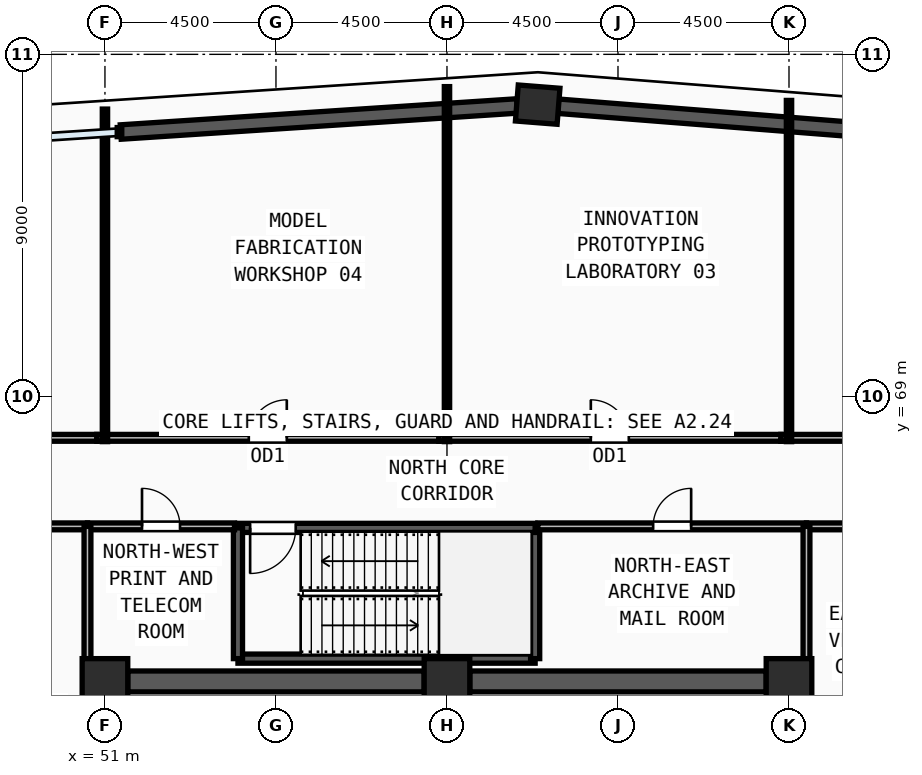
"""IFC4 building model, lengths in metres.
Left out: names, types, materials, properties, quantities, classifications, styles, units other than length and angle.
Written with IfcOpenShell. Run it as: python <this file> out.ifc"""

import sys

from ifc_helpers import new_model, si_unit, direction, frame, frame_2d, origin, origin_2d, place, context, subcontext, project, spatial, rectangle, extrude, source, transform, mapped, element, fill, save


model = new_model("IFC4")
c1 = context("Model", 3, precision=1e-05, world=origin(), true_north=direction((0.0, 1.0)))
c2 = subcontext(c1, "Body", "Model", "MODEL_VIEW")
j1 = project(units=[si_unit("LENGTHUNIT", "METRE"), si_unit("PLANEANGLEUNIT", "RADIAN")], contexts=[c1])
p1 = place(None, origin())
s1 = spatial("IfcSite", under=j1, at=p1, CompositionType="ELEMENT")
p2 = place(p1, origin())
s2 = spatial("IfcBuilding", under=s1, at=p2, CompositionType="ELEMENT")
p3 = place(p2, frame((0.0, 0.0, 282.0)))
s3 = spatial("IfcBuildingStorey", under=s2, at=p3, CompositionType="ELEMENT", Elevation=282.0)
m1 = source(origin(), c2, "Body", "SweptSolid", [
    extrude(rectangle(XDim=1.2, YDim=1.2, at=origin_2d()), origin(), (0.0, 0.0, 1.0), 4.5),
])
for number, where, z_axis, x_axis in (
    (1, (69.0, 61.5, 0.0), (0.0, 0.0, 1.0), (1.0, 0.0, 0.0)),
    (2, (60.0, 61.5, 0.0), (0.0, 0.0, 1.0), (1.0, 0.0, 0.0)),
    (3, (51.0, 61.5, 0.0), (0.0, 0.0, 1.0), (1.0, 0.0, 0.0)),
):
    element("IfcColumn", number, at=place(p3, frame(where, z_axis=z_axis, x_axis=x_axis)), inside=s3, PredefinedType="COLUMN", context=c2, shape_type="MappedRepresentation", body=[
        mapped(m1, transform((0.0, 0.0, 0.0), x_axis=(1.0, 0.0, 0.0), y_axis=(0.0, 1.0, 0.0), z_axis=(0.0, 0.0, 1.0), scale=1.0)),
    ])
m2 = source(origin(), c2, "Body", "SweptSolid", [
    extrude(rectangle(XDim=1.1, YDim=0.95, at=origin_2d()), origin(), (0.0, 0.0, 1.0), 4.5),
])
p4 = place(p3, frame((62.387, 76.677, 0.0), z_axis=(0.0, 0.0, 1.0), x_axis=(-0.996917333733, 0.078459095728, 0.0)))
e4 = element("IfcColumn", 4, at=p4, inside=s3, PredefinedType="COLUMN", context=c2, shape_type="MappedRepresentation", body=[
    mapped(m2, transform((0.0, 0.0, 0.0), x_axis=(1.0, 0.0, 0.0), y_axis=(0.0, 1.0, 0.0), z_axis=(0.0, 0.0, 1.0), scale=1.0)),
])
p5 = place(p3, frame((70.974, 76.001, 0.0), z_axis=(0.0, 0.0, 1.0), x_axis=(-0.996911930787, 0.078527716469, 0.0)))
e5 = element("IfcWall", 5, at=p5, inside=s3, PredefinedType="SOLIDWALL", context=c2, shape_type="SweptSolid", body=[
    extrude(rectangle(XDim=8.074, YDim=0.38, at=frame_2d((4.037, 0.0))), origin(), (0.0, 0.0, 1.0), 4.32),
])
p6 = place(p3, frame((61.848, 76.642, 0.0), z_axis=(0.0, 0.0, 1.0), x_axis=(-0.997844985263, -0.065615435579, 0.0)))
e6 = element("IfcWall", 6, at=p6, inside=s3, PredefinedType="SOLIDWALL", context=c2, shape_type="SweptSolid", body=[
    extrude(rectangle(XDim=10.455, YDim=0.38, at=frame_2d((5.228, 0.0))), origin(), (0.0, 0.0, 1.0), 4.32),
])
for number, where, z_axis, x_axis in (
    (7, (51.6, 61.5, 0.0), (0.0, 0.0, 1.0), (1.0, 0.0, 0.0)),
    (8, (60.6, 61.5, 0.0), (0.0, 0.0, 1.0), (1.0, 0.0, 0.0)),
):
    element("IfcWall", number, at=place(p3, frame(where, z_axis=z_axis, x_axis=x_axis)), inside=s3, PredefinedType="SHEAR", context=c2, shape_type="SweptSolid", body=[
        extrude(rectangle(XDim=7.8, YDim=0.55, at=frame_2d((3.9, 0.0))), origin(), (0.0, 0.0, 1.0), 4.32),
    ])
p7 = place(p3, frame((54.5, 62.1, 0.0), z_axis=(0.0, 0.0, 1.0), x_axis=(1.0, 0.0, 0.0)))
e9 = element("IfcWall", 9, at=p7, inside=s3, PredefinedType="SOLIDWALL", context=c2, shape_type="SweptSolid", body=[
    extrude(rectangle(XDim=7.82, YDim=0.24, at=frame_2d((3.91, 0.0))), origin(), (0.0, 0.0, 1.0), 4.32),
])
p8 = place(p3, frame((62.32, 62.1, 0.0), z_axis=(0.0, 0.0, 1.0), x_axis=(0.0, 1.0, 0.0)))
e10 = element("IfcWall", 10, at=p8, inside=s3, PredefinedType="SOLIDWALL", context=c2, shape_type="SweptSolid", body=[
    extrude(rectangle(XDim=3.44, YDim=0.24, at=frame_2d((1.72, 0.0))), origin(), (0.0, 0.0, 1.0), 4.32),
])
p9 = place(p3, frame((62.32, 65.54, 0.0), z_axis=(0.0, 0.0, 1.0), x_axis=(-1.0, 0.0, 0.0)))
e11 = element("IfcWall", 11, at=p9, inside=s3, PredefinedType="SOLIDWALL", context=c2, shape_type="SweptSolid", body=[
    extrude(rectangle(XDim=7.82, YDim=0.24, at=frame_2d((3.91, 0.0))), origin(), (0.0, 0.0, 1.0), 4.32),
])
m3 = source(origin(), c2, "Body", "SweptSolid", [
    extrude(rectangle(XDim=1.2, YDim=2.2, at=frame_2d((0.6, 1.1))), frame((0.0, 0.13, 0.0), z_axis=(0.0, -1.0, 0.0), x_axis=(1.0, 0.0, 0.0)), (0.0, 0.0, 1.0), 0.26),
])
p10 = place(p9, frame((6.3, 0.0, 0.0)))
e12 = element("IfcOpeningElement", 12, at=p10, cuts=e11, PredefinedType="OPENING", context=c2, shape_type="MappedRepresentation", body=[
    mapped(m3, transform((0.0, 0.0, 0.0), x_axis=(1.0, 0.0, 0.0), y_axis=(0.0, 1.0, 0.0), z_axis=(0.0, 0.0, 1.0), scale=1.0)),
])
p11 = place(p3, frame((54.5, 65.54, 0.0), z_axis=(0.0, 0.0, 1.0), x_axis=(0.0, -1.0, 0.0)))
e13 = element("IfcWall", 13, at=p11, inside=s3, PredefinedType="SOLIDWALL", context=c2, shape_type="SweptSolid", body=[
    extrude(rectangle(XDim=3.44, YDim=0.24, at=frame_2d((1.72, 0.0))), origin(), (0.0, 0.0, 1.0), 4.32),
])
p12 = place(p3, frame((50.54, 65.58, 0.0), z_axis=(0.0, 0.0, 1.0), x_axis=(1.0, 0.0, 0.0)))
e14 = element("IfcWall", 14, at=p12, inside=s3, PredefinedType="PARTITIONING", context=c2, shape_type="SweptSolid", body=[
    extrude(rectangle(XDim=3.87, YDim=0.18, at=frame_2d((1.935, 0.0))), origin(), (0.0, 0.0, 1.0), 4.32),
])
m4 = source(origin(), c2, "Body", "SweptSolid", [
    extrude(rectangle(XDim=1.0, YDim=2.2, at=frame_2d((0.5, 1.1))), frame((0.0, 0.1, 0.0), z_axis=(0.0, -1.0, 0.0), x_axis=(1.0, 0.0, 0.0)), (0.0, 0.0, 1.0), 0.2),
])
p13 = place(p12, frame((1.435, 0.0, 0.0)))
e15 = element("IfcOpeningElement", 15, at=p13, cuts=e14, PredefinedType="OPENING", context=c2, shape_type="MappedRepresentation", body=[
    mapped(m4, transform((0.0, 0.0, 0.0), x_axis=(1.0, 0.0, 0.0), y_axis=(0.0, 1.0, 0.0), z_axis=(0.0, 0.0, 1.0), scale=1.0)),
])
p14 = place(p3, frame((62.39, 65.58, 0.0), z_axis=(0.0, 0.0, 1.0), x_axis=(1.0, 0.0, 0.0)))
e16 = element("IfcWall", 16, at=p14, inside=s3, PredefinedType="PARTITIONING", context=c2, shape_type="SweptSolid", body=[
    extrude(rectangle(XDim=7.07, YDim=0.18, at=frame_2d((3.535, 0.0))), origin(), (0.0, 0.0, 1.0), 4.32),
])
p15 = place(p14, frame((3.035, 0.0, 0.0)))
e17 = element("IfcOpeningElement", 17, at=p15, cuts=e16, PredefinedType="OPENING", context=c2, shape_type="MappedRepresentation", body=[
    mapped(m4, transform((0.0, 0.0, 0.0), x_axis=(1.0, 0.0, 0.0), y_axis=(0.0, 1.0, 0.0), z_axis=(0.0, 0.0, 1.0), scale=1.0)),
])
p16 = place(p3, frame((46.7, 65.58, 0.0), z_axis=(0.0, 0.0, 1.0), x_axis=(1.0, 0.0, 0.0)))
e18 = element("IfcWall", 18, at=p16, inside=s3, PredefinedType="PARTITIONING", context=c2, shape_type="SweptSolid", body=[
    extrude(rectangle(XDim=3.84, YDim=0.18, at=frame_2d((1.92, 0.0))), origin(), (0.0, 0.0, 1.0), 4.32),
])
m5 = source(origin(), c2, "Body", "SweptSolid", [
    extrude(rectangle(XDim=1.3, YDim=2.2, at=frame_2d((0.65, 1.1))), frame((0.0, 0.1, 0.0), z_axis=(0.0, -1.0, 0.0), x_axis=(1.0, 0.0, 0.0)), (0.0, 0.0, 1.0), 0.2),
])
p17 = place(p16, frame((1.27, 0.0, 0.0)))
e19 = element("IfcOpeningElement", 19, at=p17, cuts=e18, PredefinedType="OPENING", context=c2, shape_type="MappedRepresentation", body=[
    mapped(m5, transform((0.0, 0.0, 0.0), x_axis=(1.0, 0.0, 0.0), y_axis=(0.0, 1.0, 0.0), z_axis=(0.0, 0.0, 1.0), scale=1.0)),
])
p18 = place(p3, frame((69.46, 65.58, 0.0), z_axis=(0.0, 0.0, 1.0), x_axis=(1.0, 0.0, 0.0)))
e20 = element("IfcWall", 20, at=p18, inside=s3, PredefinedType="PARTITIONING", context=c2, shape_type="SweptSolid", body=[
    extrude(rectangle(XDim=3.84, YDim=0.18, at=frame_2d((1.92, 0.0))), origin(), (0.0, 0.0, 1.0), 4.32),
])
p19 = place(p18, frame((1.27, 0.0, 0.0)))
e21 = element("IfcOpeningElement", 21, at=p19, cuts=e20, PredefinedType="OPENING", context=c2, shape_type="MappedRepresentation", body=[
    mapped(m5, transform((0.0, 0.0, 0.0), x_axis=(1.0, 0.0, 0.0), y_axis=(0.0, 1.0, 0.0), z_axis=(0.0, 0.0, 1.0), scale=1.0)),
])
p20 = place(p3, frame((68.785, 67.91, 0.0), z_axis=(0.0, 0.0, 1.0), x_axis=(1.0, 0.0, 0.0)))
e22 = element("IfcWall", 22, at=p20, inside=s3, PredefinedType="PARTITIONING", context=c2, shape_type="SweptSolid", body=[
    extrude(rectangle(XDim=6.845, YDim=0.18, at=frame_2d((3.422, 0.0))), origin(), (0.0, 0.0, 1.0), 4.011),
])
m6 = source(origin(), c2, "Body", "SweptSolid", [
    extrude(rectangle(XDim=1.5, YDim=2.2, at=frame_2d((0.75, 1.1))), frame((0.0, 0.1, 0.0), z_axis=(0.0, -1.0, 0.0), x_axis=(1.0, 0.0, 0.0)), (0.0, 0.0, 1.0), 0.2),
])
p21 = place(p20, frame((2.672, 0.0, 0.0)))
e23 = element("IfcOpeningElement", 23, at=p21, cuts=e22, PredefinedType="OPENING", context=c2, shape_type="MappedRepresentation", body=[
    mapped(m6, transform((0.0, 0.0, 0.0), x_axis=(1.0, 0.0, 0.0), y_axis=(0.0, 1.0, 0.0), z_axis=(0.0, 0.0, 1.0), scale=1.0)),
])
p22 = place(p3, frame((59.785, 67.91, 0.0), z_axis=(0.0, 0.0, 1.0), x_axis=(1.0, 0.0, 0.0)))
e24 = element("IfcWall", 24, at=p22, inside=s3, PredefinedType="PARTITIONING", context=c2, shape_type="SweptSolid", body=[
    extrude(rectangle(XDim=9.0, YDim=0.18, at=frame_2d((4.5, 0.0))), origin(), (0.0, 0.0, 1.0), 4.011),
])
p23 = place(p22, frame((4.0, 0.0, 0.0)))
e25 = element("IfcOpeningElement", 25, at=p23, cuts=e24, PredefinedType="OPENING", context=c2, shape_type="MappedRepresentation", body=[
    mapped(m4, transform((0.0, 0.0, 0.0), x_axis=(1.0, 0.0, 0.0), y_axis=(0.0, 1.0, 0.0), z_axis=(0.0, 0.0, 1.0), scale=1.0)),
])
p24 = place(p3, frame((50.785, 67.91, 0.0), z_axis=(0.0, 0.0, 1.0), x_axis=(1.0, 0.0, 0.0)))
e26 = element("IfcWall", 26, at=p24, inside=s3, PredefinedType="PARTITIONING", context=c2, shape_type="SweptSolid", body=[
    extrude(rectangle(XDim=9.0, YDim=0.18, at=frame_2d((4.5, 0.0))), origin(), (0.0, 0.0, 1.0), 4.011),
])
p25 = place(p24, frame((4.0, 0.0, 0.0)))
e27 = element("IfcOpeningElement", 27, at=p25, cuts=e26, PredefinedType="OPENING", context=c2, shape_type="MappedRepresentation", body=[
    mapped(m4, transform((0.0, 0.0, 0.0), x_axis=(1.0, 0.0, 0.0), y_axis=(0.0, 1.0, 0.0), z_axis=(0.0, 0.0, 1.0), scale=1.0)),
])
p26 = place(p3, frame((44.37, 67.91, 0.0), z_axis=(0.0, 0.0, 1.0), x_axis=(1.0, 0.0, 0.0)))
e28 = element("IfcWall", 28, at=p26, inside=s3, PredefinedType="PARTITIONING", context=c2, shape_type="SweptSolid", body=[
    extrude(rectangle(XDim=6.415, YDim=0.18, at=frame_2d((3.208, 0.0))), origin(), (0.0, 0.0, 1.0), 4.32),
])
p27 = place(p26, frame((2.457, 0.0, 0.0)))
e29 = element("IfcOpeningElement", 29, at=p27, cuts=e28, PredefinedType="OPENING", context=c2, shape_type="MappedRepresentation", body=[
    mapped(m6, transform((0.0, 0.0, 0.0), x_axis=(1.0, 0.0, 0.0), y_axis=(0.0, 1.0, 0.0), z_axis=(0.0, 0.0, 1.0), scale=1.0)),
])
for number, where, z_axis, x_axis in (
    (30, (50.54, 61.95, 0.0), (0.0, 0.0, 1.0), (0.0, 1.0, 0.0)),
    (31, (69.46, 61.95, 0.0), (0.0, 0.0, 1.0), (0.0, 1.0, 0.0)),
):
    element("IfcWall", number, at=place(p3, frame(where, z_axis=z_axis, x_axis=x_axis)), inside=s3, PredefinedType="PARTITIONING", context=c2, shape_type="SweptSolid", body=[
        extrude(rectangle(XDim=3.63, YDim=0.18, at=frame_2d((1.815, 0.0))), origin(), (0.0, 0.0, 1.0), 4.32),
    ])
p28 = place(p3, frame((51.0, 67.81, 0.0), z_axis=(0.0, 0.0, 1.0), x_axis=(0.0, 1.0, 0.0)))
e32 = element("IfcWall", 32, at=p28, inside=s3, PredefinedType="PARTITIONING", context=c2, shape_type="SweptSolid", body=[
    extrude(rectangle(XDim=8.75, YDim=0.14, at=frame_2d((4.375, 0.0))), origin(), (0.0, 0.0, 1.0), 4.32),
])
p29 = place(p3, frame((60.0, 67.81, 0.0), z_axis=(0.0, 0.0, 1.0), x_axis=(0.0, 1.0, 0.0)))
e33 = element("IfcWall", 33, at=p29, inside=s3, PredefinedType="PARTITIONING", context=c2, shape_type="SweptSolid", body=[
    extrude(rectangle(XDim=9.341, YDim=0.14, at=frame_2d((4.67, 0.0))), origin(), (0.0, 0.0, 1.0), 4.32),
])
p30 = place(p3, frame((69.0, 67.81, 0.0), z_axis=(0.0, 0.0, 1.0), x_axis=(0.0, 1.0, 0.0)))
e34 = element("IfcWall", 34, at=p30, inside=s3, PredefinedType="PARTITIONING", context=c2, shape_type="SweptSolid", body=[
    extrude(rectangle(XDim=8.978, YDim=0.14, at=frame_2d((4.489, 0.0))), origin(), (0.0, 0.0, 1.0), 4.32),
])
m7 = source(origin(), c2, "Body", "SweptSolid", [
    extrude(rectangle(XDim=1.2, YDim=2.2, at=frame_2d((0.6, 1.1))), frame((0.0, 0.025, 0.0), z_axis=(0.0, -1.0, 0.0), x_axis=(1.0, 0.0, 0.0)), (0.0, 0.0, 1.0), 0.05),
])
p31 = place(p10, origin())
e35 = element("IfcDoor", 35, at=p31, inside=s3, OperationType="SINGLE_SWING_RIGHT", PredefinedType="DOOR", context=c2, shape_type="MappedRepresentation", body=[
    mapped(m7, transform((0.0, 0.0, 0.0), x_axis=(1.0, 0.0, 0.0), y_axis=(0.0, 1.0, 0.0), z_axis=(0.0, 0.0, 1.0), scale=1.0)),
])
fill(e12, e35)
m8 = source(origin(), c2, "Body", "SweptSolid", [
    extrude(rectangle(XDim=1.0, YDim=2.2, at=frame_2d((0.5, 1.1))), frame((0.0, 0.025, 0.0), z_axis=(0.0, -1.0, 0.0), x_axis=(1.0, 0.0, 0.0)), (0.0, 0.0, 1.0), 0.05),
])
p32 = place(p13, origin())
e36 = element("IfcDoor", 36, at=p32, inside=s3, OperationType="SINGLE_SWING_LEFT", PredefinedType="DOOR", context=c2, shape_type="MappedRepresentation", body=[
    mapped(m8, transform((0.0, 0.0, 0.0), x_axis=(1.0, 0.0, 0.0), y_axis=(0.0, 1.0, 0.0), z_axis=(0.0, 0.0, 1.0), scale=1.0)),
])
fill(e15, e36)
p33 = place(p15, origin())
e37 = element("IfcDoor", 37, at=p33, inside=s3, OperationType="SINGLE_SWING_RIGHT", PredefinedType="DOOR", context=c2, shape_type="MappedRepresentation", body=[
    mapped(m8, transform((0.0, 0.0, 0.0), x_axis=(1.0, 0.0, 0.0), y_axis=(0.0, 1.0, 0.0), z_axis=(0.0, 0.0, 1.0), scale=1.0)),
])
fill(e17, e37)
p34 = place(p23, origin())
e38 = element("IfcDoor", 38, at=p34, inside=s3, OperationType="SINGLE_SWING_LEFT", PredefinedType="DOOR", context=c2, shape_type="MappedRepresentation", body=[
    mapped(m8, transform((0.0, 0.0, 0.0), x_axis=(1.0, 0.0, 0.0), y_axis=(0.0, 1.0, 0.0), z_axis=(0.0, 0.0, 1.0), scale=1.0)),
])
fill(e25, e38)
p35 = place(p25, origin())
e39 = element("IfcDoor", 39, at=p35, inside=s3, OperationType="SINGLE_SWING_RIGHT", PredefinedType="DOOR", context=c2, shape_type="MappedRepresentation", body=[
    mapped(m8, transform((0.0, 0.0, 0.0), x_axis=(1.0, 0.0, 0.0), y_axis=(0.0, 1.0, 0.0), z_axis=(0.0, 0.0, 1.0), scale=1.0)),
])
fill(e27, e39)
save(model, sys.argv[1])
